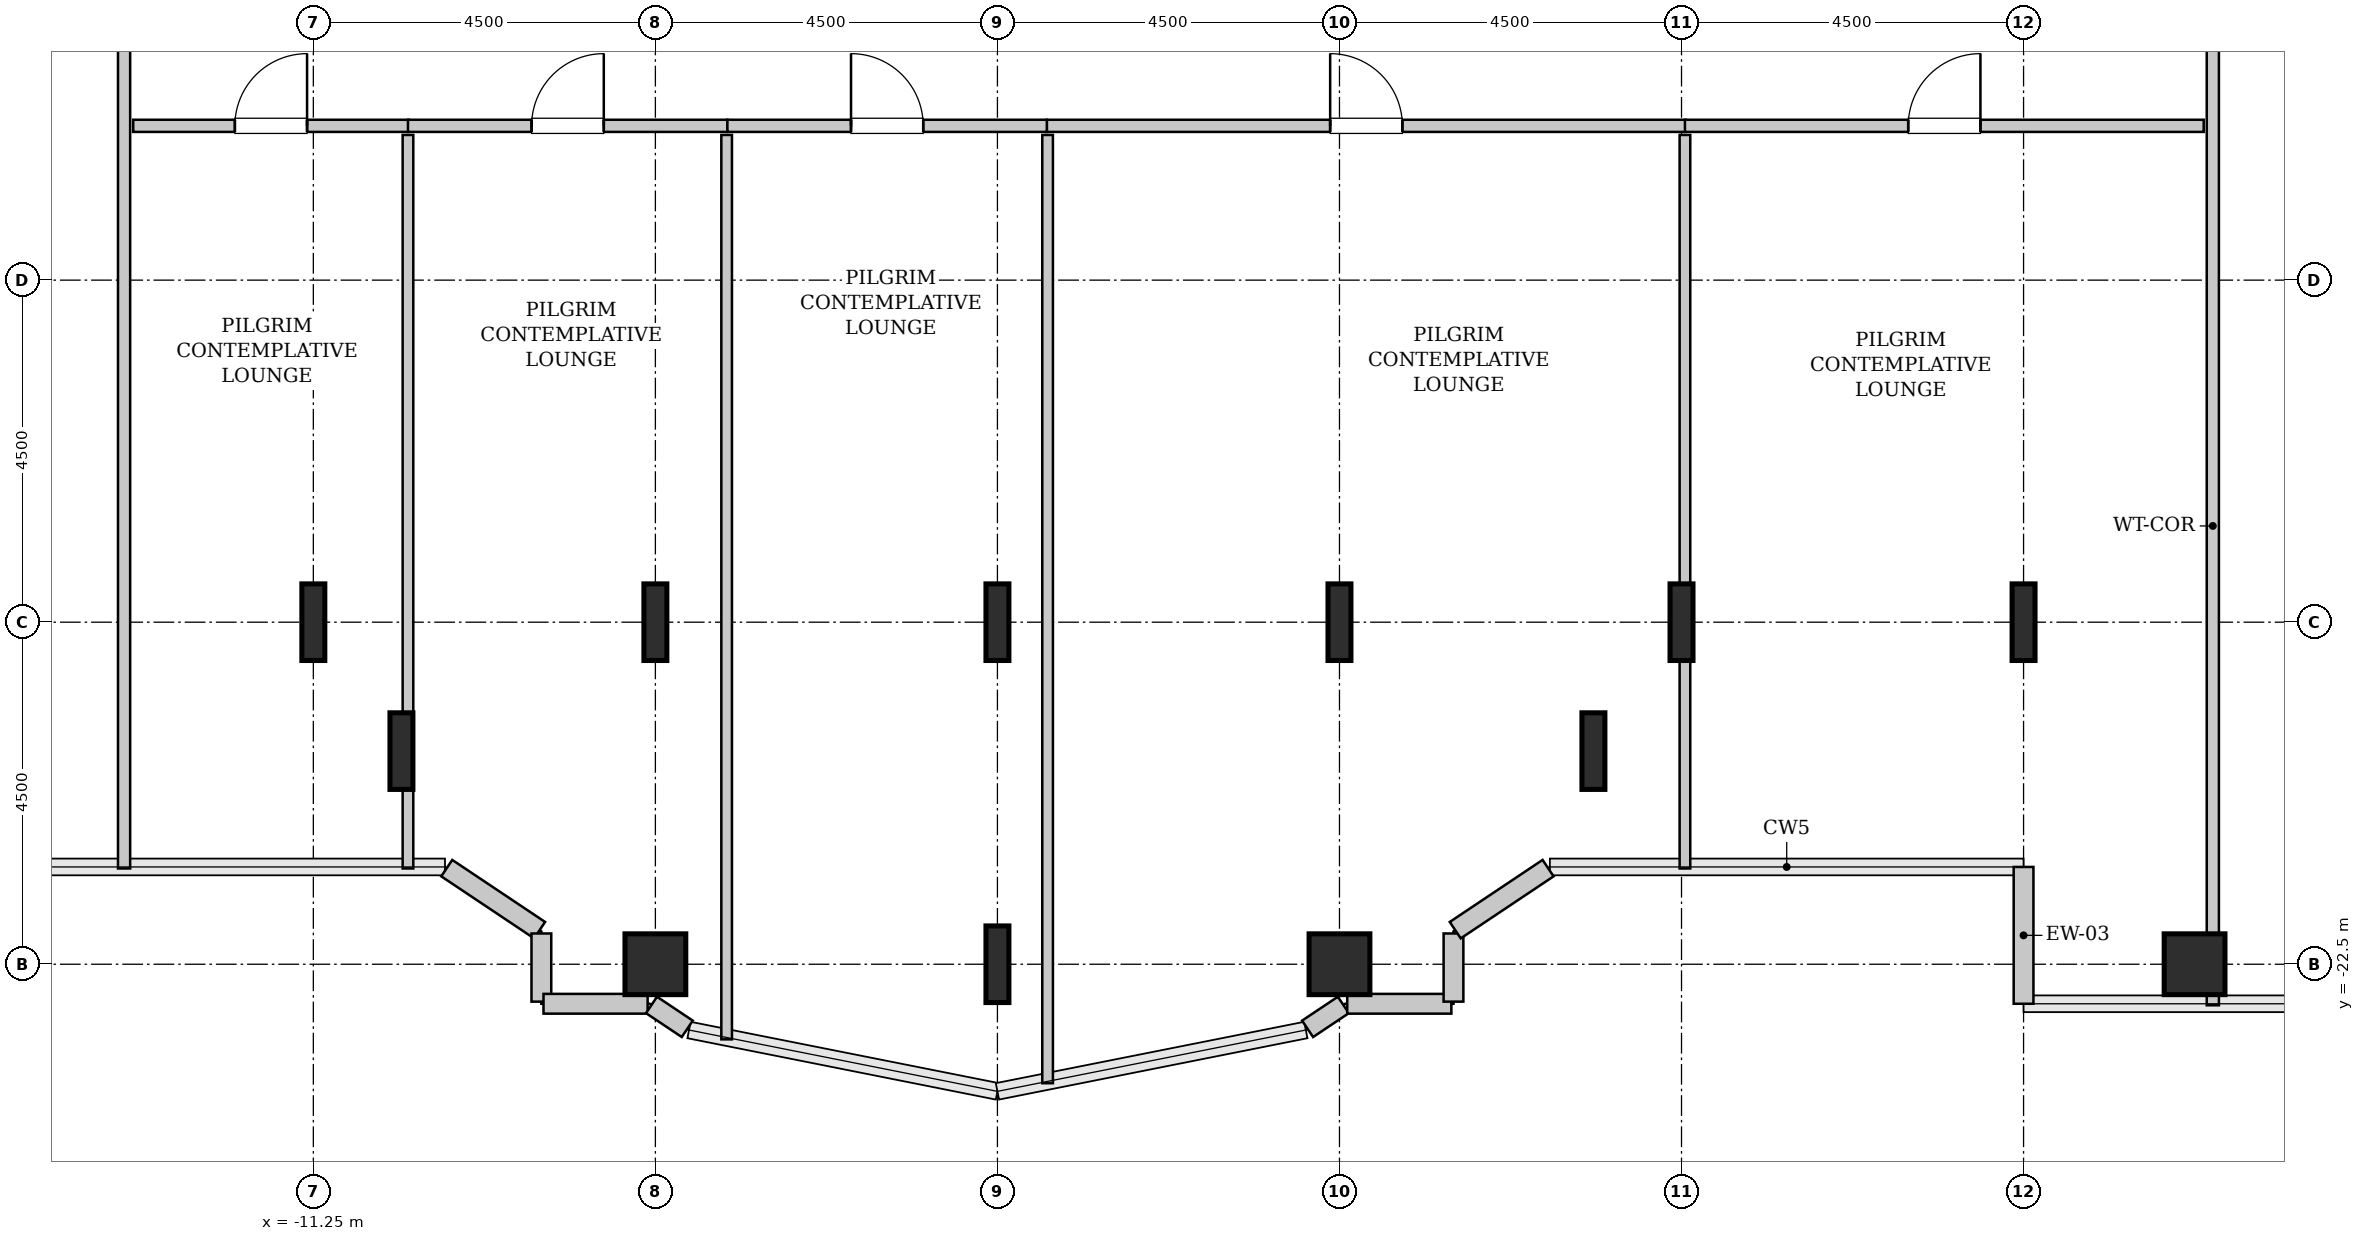
"""IFC4 building model, lengths in metres.
Left out: names, types, materials, properties, quantities, classifications, styles, units other than length and angle.
Written with IfcOpenShell. Run it as: python <this file> out.ifc"""

import sys

from ifc_helpers import new_model, si_unit, direction, frame, frame_2d, origin, origin_2d, place, context, subcontext, project, spatial, rectangle, hollow_rectangle, i_section, extrude, source, transform, mapped, element, fill, save


model = new_model("IFC4")
c1 = context("Model", 3, precision=1e-05, world=origin(), true_north=direction((0.0, 1.0)))
c2 = subcontext(c1, "Body", "Model", "MODEL_VIEW")
j1 = project(units=[si_unit("LENGTHUNIT", "METRE"), si_unit("PLANEANGLEUNIT", "RADIAN")], contexts=[c1])
p1 = place(None, origin())
s1 = spatial("IfcSite", under=j1, at=p1, CompositionType="ELEMENT")
p2 = place(p1, origin())
s2 = spatial("IfcBuilding", under=s1, at=p2, CompositionType="ELEMENT")
p3 = place(p2, frame((0.0, 0.0, 140.2)))
s3 = spatial("IfcBuildingStorey", under=s2, at=p3, CompositionType="ELEMENT", Elevation=140.2)
m1 = source(origin(), c2, "Body", "SweptSolid", [
    extrude(i_section(OverallWidth=0.302, OverallDepth=1.008, WebThickness=0.021, FlangeThickness=0.04, FilletRadius=0.03, at=origin_2d()), origin(), (0.0, 0.0, 1.0), 3.8),
])
for number, where, z_axis, x_axis in (
    (1, (-11.25, -18.0, 0.0), (0.0, 0.0, 1.0), (1.0, 0.0, 0.0)),
    (2, (-10.091, -19.696, 0.0), (0.0, 0.0, 1.0), (1.0, 0.0, 0.0)),
):
    element("IfcColumn", number, at=place(p3, frame(where, z_axis=z_axis, x_axis=x_axis)), inside=s3, PredefinedType="COLUMN", context=c2, shape_type="MappedRepresentation", body=[
        mapped(m1, transform((0.0, 0.0, 0.0), x_axis=(1.0, 0.0, 0.0), y_axis=(0.0, 1.0, 0.0), z_axis=(0.0, 0.0, 1.0), scale=1.0)),
    ])
m2 = source(origin(), c2, "Body", "SweptSolid", [
    extrude(hollow_rectangle(XDim=0.8, YDim=0.8, WallThickness=0.04, InnerFilletRadius=0.04, OuterFilletRadius=0.08, at=origin_2d()), origin(), (0.0, 0.0, 1.0), 3.8),
])
p4 = place(p3, frame((-6.75, -22.5, 0.0), z_axis=(0.0, 0.0, 1.0), x_axis=(1.0, 0.0, 0.0)))
e3 = element("IfcColumn", 3, at=p4, inside=s3, PredefinedType="COLUMN", context=c2, shape_type="MappedRepresentation", body=[
    mapped(m2, transform((0.0, 0.0, 0.0), x_axis=(1.0, 0.0, 0.0), y_axis=(0.0, 1.0, 0.0), z_axis=(0.0, 0.0, 1.0), scale=1.0)),
])
for number, where, z_axis, x_axis in (
    (4, (-6.75, -18.0, 0.0), (0.0, 0.0, 1.0), (1.0, 0.0, 0.0)),
    (5, (-2.25, -22.5, 0.0), (0.0, 0.0, 1.0), (1.0, 0.0, 0.0)),
    (6, (-2.25, -18.0, 0.0), (0.0, 0.0, 1.0), (1.0, 0.0, 0.0)),
):
    element("IfcColumn", number, at=place(p3, frame(where, z_axis=z_axis, x_axis=x_axis)), inside=s3, PredefinedType="COLUMN", context=c2, shape_type="MappedRepresentation", body=[
        mapped(m1, transform((0.0, 0.0, 0.0), x_axis=(1.0, 0.0, 0.0), y_axis=(0.0, 1.0, 0.0), z_axis=(0.0, 0.0, 1.0), scale=1.0)),
    ])
p5 = place(p3, frame((2.25, -22.5, 0.0), z_axis=(0.0, 0.0, 1.0), x_axis=(1.0, 0.0, 0.0)))
e7 = element("IfcColumn", 7, at=p5, inside=s3, PredefinedType="COLUMN", context=c2, shape_type="MappedRepresentation", body=[
    mapped(m2, transform((0.0, 0.0, 0.0), x_axis=(1.0, 0.0, 0.0), y_axis=(0.0, 1.0, 0.0), z_axis=(0.0, 0.0, 1.0), scale=1.0)),
])
for number, where, z_axis, x_axis in (
    (8, (2.25, -18.0, 0.0), (0.0, 0.0, 1.0), (1.0, 0.0, 0.0)),
    (9, (5.591, -19.696, 0.0), (0.0, 0.0, 1.0), (1.0, 0.0, 0.0)),
    (10, (6.75, -18.0, 0.0), (0.0, 0.0, 1.0), (1.0, 0.0, 0.0)),
    (11, (11.25, -18.0, 0.0), (0.0, 0.0, 1.0), (1.0, 0.0, 0.0)),
):
    element("IfcColumn", number, at=place(p3, frame(where, z_axis=z_axis, x_axis=x_axis)), inside=s3, PredefinedType="COLUMN", context=c2, shape_type="MappedRepresentation", body=[
        mapped(m1, transform((0.0, 0.0, 0.0), x_axis=(1.0, 0.0, 0.0), y_axis=(0.0, 1.0, 0.0), z_axis=(0.0, 0.0, 1.0), scale=1.0)),
    ])
p6 = place(p3, frame((13.5, -22.5, 0.0), z_axis=(0.0, 0.0, 1.0), x_axis=(1.0, 0.0, 0.0)))
e12 = element("IfcColumn", 12, at=p6, inside=s3, PredefinedType="COLUMN", context=c2, shape_type="MappedRepresentation", body=[
    mapped(m2, transform((0.0, 0.0, 0.0), x_axis=(1.0, 0.0, 0.0), y_axis=(0.0, 1.0, 0.0), z_axis=(0.0, 0.0, 1.0), scale=1.0)),
])
m3 = source(origin(), c2, "Body", "SweptSolid", [
    extrude(rectangle(XDim=1.8, YDim=0.26, at=frame_2d((0.9, 0.0))), origin(), (0.0, 0.0, 1.0), 3.5),
])
p7 = place(p3, frame((11.25, -21.22, 0.0), z_axis=(0.0, 0.0, 1.0), x_axis=(0.0, -1.0, 0.0)))
e13 = element("IfcWall", 13, at=p7, inside=s3, PredefinedType="SOLIDWALL", context=c2, shape_type="MappedRepresentation", body=[
    mapped(m3, transform((0.0, 0.0, 0.0), x_axis=(1.0, 0.0, 0.0), y_axis=(0.0, 1.0, 0.0), z_axis=(0.0, 0.0, 1.0), scale=1.0)),
])
m4 = source(origin(), c2, "Body", "SweptSolid", [
    extrude(rectangle(XDim=1.469, YDim=0.26, at=frame_2d((0.734, 0.0))), origin(), (0.0, 0.0, 1.0), 3.5),
])
p8 = place(p3, frame((-9.495, -21.236, 0.0), z_axis=(0.0, 0.0, 1.0), x_axis=(0.831461760506, -0.555581983884, 0.0)))
e14 = element("IfcWall", 14, at=p8, inside=s3, PredefinedType="SOLIDWALL", context=c2, shape_type="MappedRepresentation", body=[
    mapped(m4, transform((0.0, 0.0, 0.0), x_axis=(1.0, 0.0, 0.0), y_axis=(0.0, 1.0, 0.0), z_axis=(0.0, 0.0, 1.0), scale=1.0)),
])
m5 = source(origin(), c2, "Body", "SweptSolid", [
    extrude(rectangle(XDim=0.897, YDim=0.26, at=frame_2d((0.448, 0.0))), origin(), (0.0, 0.0, 1.0), 3.5),
])
p9 = place(p3, frame((-8.25, -22.095, 0.0), z_axis=(0.0, 0.0, 1.0), x_axis=(0.0, -1.0, 0.0)))
e15 = element("IfcWall", 15, at=p9, inside=s3, PredefinedType="SOLIDWALL", context=c2, shape_type="MappedRepresentation", body=[
    mapped(m5, transform((0.0, 0.0, 0.0), x_axis=(1.0, 0.0, 0.0), y_axis=(0.0, 1.0, 0.0), z_axis=(0.0, 0.0, 1.0), scale=1.0)),
])
m6 = source(origin(), c2, "Body", "SweptSolid", [
    extrude(rectangle(XDim=1.37, YDim=0.26, at=frame_2d((0.685, 0.0))), origin(), (0.0, 0.0, 1.0), 3.5),
])
p10 = place(p3, frame((-8.222, -23.02, 0.0), z_axis=(0.0, 0.0, 1.0), x_axis=(1.0, 0.0, 0.0)))
e16 = element("IfcWall", 16, at=p10, inside=s3, PredefinedType="SOLIDWALL", context=c2, shape_type="MappedRepresentation", body=[
    mapped(m6, transform((0.0, 0.0, 0.0), x_axis=(1.0, 0.0, 0.0), y_axis=(0.0, 1.0, 0.0), z_axis=(0.0, 0.0, 1.0), scale=1.0)),
])
m7 = source(origin(), c2, "Body", "SweptSolid", [
    extrude(rectangle(XDim=0.565, YDim=0.26, at=frame_2d((0.283, 0.0))), origin(), (0.0, 0.0, 1.0), 3.5),
])
for number, where, z_axis, x_axis in (
    (17, (-6.801, -23.036, 0.0), (0.0, 0.0, 1.0), (0.832, -0.555, 0.0)),
    (18, (1.831, -23.35, 0.0), (0.0, 0.0, 1.0), (0.832, 0.555, 0.0)),
):
    element("IfcWall", number, at=place(p3, frame(where, z_axis=z_axis, x_axis=x_axis)), inside=s3, PredefinedType="SOLIDWALL", context=c2, shape_type="MappedRepresentation", body=[
        mapped(m7, transform((0.0, 0.0, 0.0), x_axis=(1.0, 0.0, 0.0), y_axis=(0.0, 1.0, 0.0), z_axis=(0.0, 0.0, 1.0), scale=1.0)),
    ])
p11 = place(p3, frame((2.352, -23.02, 0.0), z_axis=(0.0, 0.0, 1.0), x_axis=(1.0, 0.0, 0.0)))
e19 = element("IfcWall", 19, at=p11, inside=s3, PredefinedType="SOLIDWALL", context=c2, shape_type="MappedRepresentation", body=[
    mapped(m6, transform((0.0, 0.0, 0.0), x_axis=(1.0, 0.0, 0.0), y_axis=(0.0, 1.0, 0.0), z_axis=(0.0, 0.0, 1.0), scale=1.0)),
])
p12 = place(p3, frame((3.75, -22.992, 0.0), z_axis=(0.0, 0.0, 1.0), x_axis=(0.0, 1.0, 0.0)))
e20 = element("IfcWall", 20, at=p12, inside=s3, PredefinedType="SOLIDWALL", context=c2, shape_type="MappedRepresentation", body=[
    mapped(m5, transform((0.0, 0.0, 0.0), x_axis=(1.0, 0.0, 0.0), y_axis=(0.0, 1.0, 0.0), z_axis=(0.0, 0.0, 1.0), scale=1.0)),
])
p13 = place(p3, frame((3.773, -22.052, 0.0), z_axis=(0.0, 0.0, 1.0), x_axis=(0.831461760506, 0.555581983884, 0.0)))
e21 = element("IfcWall", 21, at=p13, inside=s3, PredefinedType="SOLIDWALL", context=c2, shape_type="MappedRepresentation", body=[
    mapped(m4, transform((0.0, 0.0, 0.0), x_axis=(1.0, 0.0, 0.0), y_axis=(0.0, 1.0, 0.0), z_axis=(0.0, 0.0, 1.0), scale=1.0)),
])
m8 = source(origin(), c2, "Body", "SweptSolid", [
    extrude(rectangle(XDim=14.045, YDim=0.16, at=frame_2d((7.022, 0.0))), origin(), (0.0, 0.0, 1.0), 3.485),
])
p14 = place(p3, frame((-13.74, -21.24, 0.0), z_axis=(0.0, 0.0, 1.0), x_axis=(0.0, 1.0, 0.0)))
e22 = element("IfcWall", 22, at=p14, inside=s3, PredefinedType="PARTITIONING", context=c2, shape_type="MappedRepresentation", body=[
    mapped(m8, transform((0.0, 0.0, 0.0), x_axis=(1.0, 0.0, 0.0), y_axis=(0.0, 1.0, 0.0), z_axis=(0.0, 0.0, 1.0), scale=1.0)),
])
p15 = place(p14, frame((11.413, 0.0, 0.0)))
e23 = element("IfcOpeningElement", 23, at=p15, cuts=e22, PredefinedType="OPENING", context=c2, shape_type="SweptSolid", body=[
    extrude(rectangle(XDim=0.95, YDim=2.1, at=frame_2d((0.475, 1.05))), frame((0.0, 0.09, 0.0), z_axis=(0.0, -1.0, 0.0), x_axis=(1.0, 0.0, 0.0)), (0.0, 0.0, 1.0), 0.18),
])
m9 = source(origin(), c2, "Body", "SweptSolid", [
    extrude(rectangle(XDim=14.545, YDim=0.16, at=frame_2d((7.272, 0.0))), origin(), (0.0, 0.0, 1.0), 3.485),
])
p16 = place(p3, frame((13.74, -23.04, 0.0), z_axis=(0.0, 0.0, 1.0), x_axis=(0.0, 1.0, 0.0)))
e24 = element("IfcWall", 24, at=p16, inside=s3, PredefinedType="PARTITIONING", context=c2, shape_type="MappedRepresentation", body=[
    mapped(m9, transform((0.0, 0.0, 0.0), x_axis=(1.0, 0.0, 0.0), y_axis=(0.0, 1.0, 0.0), z_axis=(0.0, 0.0, 1.0), scale=1.0)),
])
p17 = place(p16, frame((12.562, 0.0, 0.0)))
e25 = element("IfcOpeningElement", 25, at=p17, cuts=e24, PredefinedType="OPENING", context=c2, shape_type="SweptSolid", body=[
    extrude(rectangle(XDim=0.95, YDim=2.1, at=frame_2d((0.475, 1.05))), frame((0.0, 0.09, 0.0), z_axis=(0.0, -1.0, 0.0), x_axis=(1.0, 0.0, 0.0)), (0.0, 0.0, 1.0), 0.18),
])
m10 = source(origin(), c2, "Body", "SweptSolid", [
    extrude(rectangle(XDim=3.625, YDim=0.16, at=frame_2d((1.812, 0.0))), origin(), (0.0, 0.0, 1.0), 3.485),
])
p18 = place(p3, frame((-13.62, -11.47, 0.0), z_axis=(0.0, 0.0, 1.0), x_axis=(1.0, 0.0, 0.0)))
e26 = element("IfcWall", 26, at=p18, inside=s3, PredefinedType="PARTITIONING", context=c2, shape_type="MappedRepresentation", body=[
    mapped(m10, transform((0.0, 0.0, 0.0), x_axis=(1.0, 0.0, 0.0), y_axis=(0.0, 1.0, 0.0), z_axis=(0.0, 0.0, 1.0), scale=1.0)),
])
p19 = place(p18, frame((1.337, 0.0, 0.0)))
e27 = element("IfcOpeningElement", 27, at=p19, cuts=e26, PredefinedType="OPENING", context=c2, shape_type="SweptSolid", body=[
    extrude(rectangle(XDim=0.95, YDim=2.1, at=frame_2d((0.475, 1.05))), frame((0.0, 0.09, 0.0), z_axis=(0.0, -1.0, 0.0), x_axis=(1.0, 0.0, 0.0)), (0.0, 0.0, 1.0), 0.18),
])
m11 = source(origin(), c2, "Body", "SweptSolid", [
    extrude(rectangle(XDim=9.65, YDim=0.14, at=frame_2d((4.825, 0.0))), origin(), (0.0, 0.0, 1.0), 3.485),
])
p20 = place(p3, frame((-10.005, -21.24, 0.0), z_axis=(0.0, 0.0, 1.0), x_axis=(0.0, 1.0, 0.0)))
e28 = element("IfcWall", 28, at=p20, inside=s3, PredefinedType="PARTITIONING", context=c2, shape_type="MappedRepresentation", body=[
    mapped(m11, transform((0.0, 0.0, 0.0), x_axis=(1.0, 0.0, 0.0), y_axis=(0.0, 1.0, 0.0), z_axis=(0.0, 0.0, 1.0), scale=1.0)),
])
m12 = source(origin(), c2, "Body", "SweptSolid", [
    extrude(rectangle(XDim=8.405, YDim=0.16, at=frame_2d((4.203, 0.0))), origin(), (0.0, 0.0, 1.0), 3.485),
])
p21 = place(p3, frame((-1.6, -11.47, 0.0), z_axis=(0.0, 0.0, 1.0), x_axis=(1.0, 0.0, 0.0)))
e29 = element("IfcWall", 29, at=p21, inside=s3, PredefinedType="PARTITIONING", context=c2, shape_type="MappedRepresentation", body=[
    mapped(m12, transform((0.0, 0.0, 0.0), x_axis=(1.0, 0.0, 0.0), y_axis=(0.0, 1.0, 0.0), z_axis=(0.0, 0.0, 1.0), scale=1.0)),
])
p22 = place(p21, frame((3.728, 0.0, 0.0)))
e30 = element("IfcOpeningElement", 30, at=p22, cuts=e29, PredefinedType="OPENING", context=c2, shape_type="SweptSolid", body=[
    extrude(rectangle(XDim=0.95, YDim=2.1, at=frame_2d((0.475, 1.05))), frame((0.0, 0.09, 0.0), z_axis=(0.0, -1.0, 0.0), x_axis=(1.0, 0.0, 0.0)), (0.0, 0.0, 1.0), 0.18),
])
m13 = source(origin(), c2, "Body", "SweptSolid", [
    extrude(rectangle(XDim=12.475, YDim=0.14, at=frame_2d((6.238, 0.0))), origin(), (0.0, 0.0, 1.0), 3.485),
])
p23 = place(p3, frame((-1.59, -24.065, 0.0), z_axis=(0.0, 0.0, 1.0), x_axis=(0.0, 1.0, 0.0)))
e31 = element("IfcWall", 31, at=p23, inside=s3, PredefinedType="PARTITIONING", context=c2, shape_type="MappedRepresentation", body=[
    mapped(m13, transform((0.0, 0.0, 0.0), x_axis=(1.0, 0.0, 0.0), y_axis=(0.0, 1.0, 0.0), z_axis=(0.0, 0.0, 1.0), scale=1.0)),
])
p24 = place(p3, frame((6.795, -21.24, 0.0), z_axis=(0.0, 0.0, 1.0), x_axis=(0.0, 1.0, 0.0)))
e32 = element("IfcWall", 32, at=p24, inside=s3, PredefinedType="PARTITIONING", context=c2, shape_type="MappedRepresentation", body=[
    mapped(m11, transform((0.0, 0.0, 0.0), x_axis=(1.0, 0.0, 0.0), y_axis=(0.0, 1.0, 0.0), z_axis=(0.0, 0.0, 1.0), scale=1.0)),
])
m14 = source(origin(), c2, "Body", "SweptSolid", [
    extrude(rectangle(XDim=4.202, YDim=0.16, at=frame_2d((2.101, 0.0))), origin(), (0.0, 0.0, 1.0), 3.485),
])
p25 = place(p3, frame((-10.005, -11.47, 0.0), z_axis=(0.0, 0.0, 1.0), x_axis=(1.0, 0.0, 0.0)))
e33 = element("IfcWall", 33, at=p25, inside=s3, PredefinedType="PARTITIONING", context=c2, shape_type="MappedRepresentation", body=[
    mapped(m14, transform((0.0, 0.0, 0.0), x_axis=(1.0, 0.0, 0.0), y_axis=(0.0, 1.0, 0.0), z_axis=(0.0, 0.0, 1.0), scale=1.0)),
])
p26 = place(p25, frame((1.626, 0.0, 0.0)))
e34 = element("IfcOpeningElement", 34, at=p26, cuts=e33, PredefinedType="OPENING", context=c2, shape_type="SweptSolid", body=[
    extrude(rectangle(XDim=0.95, YDim=2.1, at=frame_2d((0.475, 1.05))), frame((0.0, 0.09, 0.0), z_axis=(0.0, -1.0, 0.0), x_axis=(1.0, 0.0, 0.0)), (0.0, 0.0, 1.0), 0.18),
])
m15 = source(origin(), c2, "Body", "SweptSolid", [
    extrude(rectangle(XDim=11.898, YDim=0.14, at=frame_2d((5.949, 0.0))), origin(), (0.0, 0.0, 1.0), 3.485),
])
p27 = place(p3, frame((-5.812, -23.488, 0.0), z_axis=(0.0, 0.0, 1.0), x_axis=(0.0, 1.0, 0.0)))
e35 = element("IfcWall", 35, at=p27, inside=s3, PredefinedType="PARTITIONING", context=c2, shape_type="MappedRepresentation", body=[
    mapped(m15, transform((0.0, 0.0, 0.0), x_axis=(1.0, 0.0, 0.0), y_axis=(0.0, 1.0, 0.0), z_axis=(0.0, 0.0, 1.0), scale=1.0)),
])
p28 = place(p3, frame((-5.802, -11.47, 0.0), z_axis=(0.0, 0.0, 1.0), x_axis=(1.0, 0.0, 0.0)))
e36 = element("IfcWall", 36, at=p28, inside=s3, PredefinedType="PARTITIONING", context=c2, shape_type="MappedRepresentation", body=[
    mapped(m14, transform((0.0, 0.0, 0.0), x_axis=(1.0, 0.0, 0.0), y_axis=(0.0, 1.0, 0.0), z_axis=(0.0, 0.0, 1.0), scale=1.0)),
])
p29 = place(p28, frame((1.626, 0.0, 0.0)))
e37 = element("IfcOpeningElement", 37, at=p29, cuts=e36, PredefinedType="OPENING", context=c2, shape_type="SweptSolid", body=[
    extrude(rectangle(XDim=0.95, YDim=2.1, at=frame_2d((0.475, 1.05))), frame((0.0, 0.09, 0.0), z_axis=(0.0, -1.0, 0.0), x_axis=(1.0, 0.0, 0.0)), (0.0, 0.0, 1.0), 0.18),
])
m16 = source(origin(), c2, "Body", "SweptSolid", [
    extrude(rectangle(XDim=6.825, YDim=0.16, at=frame_2d((3.413, 0.0))), origin(), (0.0, 0.0, 1.0), 3.485),
])
p30 = place(p3, frame((6.795, -11.47, 0.0), z_axis=(0.0, 0.0, 1.0), x_axis=(1.0, 0.0, 0.0)))
e38 = element("IfcWall", 38, at=p30, inside=s3, PredefinedType="PARTITIONING", context=c2, shape_type="MappedRepresentation", body=[
    mapped(m16, transform((0.0, 0.0, 0.0), x_axis=(1.0, 0.0, 0.0), y_axis=(0.0, 1.0, 0.0), z_axis=(0.0, 0.0, 1.0), scale=1.0)),
])
p31 = place(p30, frame((2.938, 0.0, 0.0)))
e39 = element("IfcOpeningElement", 39, at=p31, cuts=e38, PredefinedType="OPENING", context=c2, shape_type="SweptSolid", body=[
    extrude(rectangle(XDim=0.95, YDim=2.1, at=frame_2d((0.475, 1.05))), frame((0.0, 0.09, 0.0), z_axis=(0.0, -1.0, 0.0), x_axis=(1.0, 0.0, 0.0)), (0.0, 0.0, 1.0), 0.18),
])
m17 = source(origin(), c2, "Body", "SweptSolid", [
    extrude(rectangle(XDim=0.95, YDim=2.1, at=frame_2d((0.475, 1.05))), frame((0.0, 0.025, 0.0), z_axis=(0.0, -1.0, 0.0), x_axis=(1.0, 0.0, 0.0)), (0.0, 0.0, 1.0), 0.05),
])
p32 = place(p19, origin())
e40 = element("IfcDoor", 40, at=p32, inside=s3, OperationType="SINGLE_SWING_RIGHT", PredefinedType="DOOR", context=c2, shape_type="MappedRepresentation", body=[
    mapped(m17, transform((0.0, 0.0, 0.0), x_axis=(1.0, 0.0, 0.0), y_axis=(0.0, 1.0, 0.0), z_axis=(0.0, 0.0, 1.0), scale=1.0)),
])
fill(e27, e40)
p33 = place(p22, origin())
e41 = element("IfcDoor", 41, at=p33, inside=s3, OperationType="SINGLE_SWING_LEFT", PredefinedType="DOOR", context=c2, shape_type="MappedRepresentation", body=[
    mapped(m17, transform((0.0, 0.0, 0.0), x_axis=(1.0, 0.0, 0.0), y_axis=(0.0, 1.0, 0.0), z_axis=(0.0, 0.0, 1.0), scale=1.0)),
])
fill(e30, e41)
p34 = place(p26, origin())
e42 = element("IfcDoor", 42, at=p34, inside=s3, OperationType="SINGLE_SWING_RIGHT", PredefinedType="DOOR", context=c2, shape_type="MappedRepresentation", body=[
    mapped(m17, transform((0.0, 0.0, 0.0), x_axis=(1.0, 0.0, 0.0), y_axis=(0.0, 1.0, 0.0), z_axis=(0.0, 0.0, 1.0), scale=1.0)),
])
fill(e34, e42)
p35 = place(p29, origin())
e43 = element("IfcDoor", 43, at=p35, inside=s3, OperationType="SINGLE_SWING_LEFT", PredefinedType="DOOR", context=c2, shape_type="MappedRepresentation", body=[
    mapped(m17, transform((0.0, 0.0, 0.0), x_axis=(1.0, 0.0, 0.0), y_axis=(0.0, 1.0, 0.0), z_axis=(0.0, 0.0, 1.0), scale=1.0)),
])
fill(e37, e43)
p36 = place(p31, origin())
e44 = element("IfcDoor", 44, at=p36, inside=s3, OperationType="SINGLE_SWING_RIGHT", PredefinedType="DOOR", context=c2, shape_type="MappedRepresentation", body=[
    mapped(m17, transform((0.0, 0.0, 0.0), x_axis=(1.0, 0.0, 0.0), y_axis=(0.0, 1.0, 0.0), z_axis=(0.0, 0.0, 1.0), scale=1.0)),
])
fill(e39, e44)
save(model, sys.argv[1])
